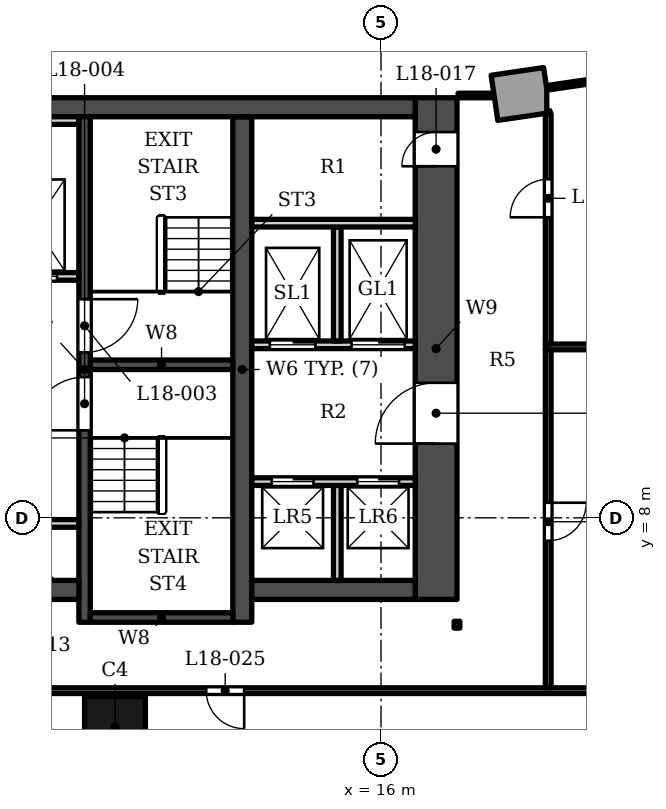
"""IFC4 building model, lengths in metres.
Left out: names, types, materials, properties, quantities, classifications, styles, units other than length and angle.
Written with IfcOpenShell. Run it as: python <this file> out.ifc"""

import sys

from ifc_helpers import new_model, si_unit, direction, frame, frame_2d, origin, origin_2d, place, context, subcontext, project, spatial, polyline, rectangle, outline, extrude, clip, halfspace, element, fill, save


model = new_model("IFC4")
c1 = context("Model", 3, precision=1e-05, world=origin(), true_north=direction((0.0, 1.0)))
c2 = subcontext(c1, "Body", "Model", "MODEL_VIEW")
j1 = project(units=[si_unit("LENGTHUNIT", "METRE"), si_unit("PLANEANGLEUNIT", "RADIAN")], contexts=[c1])
p1 = place(None, origin())
s1 = spatial("IfcSite", under=j1, at=p1, CompositionType="ELEMENT")
p2 = place(p1, origin())
s2 = spatial("IfcBuilding", under=s1, at=p2, CompositionType="ELEMENT")
p3 = place(p2, frame((0.0, 0.0, 86.8)))
s3 = spatial("IfcBuildingStorey", under=s2, at=p3, CompositionType="ELEMENT", Elevation=86.8)
p4 = place(p3, frame((-16.9, 18.802, 0.0), z_axis=(0.0, 0.0, 1.0), x_axis=(1.0, 0.0, 0.0)))
e1 = element("IfcWall", 1, at=p4, inside=s3, PredefinedType="SHEAR", context=c2, shape_type="SweptSolid", body=[
    extrude(rectangle(XDim=33.8, YDim=0.5, at=frame_2d((16.9, 0.0))), origin(), (0.0, 0.0, 1.0), 5.0),
])
p5 = place(p3, frame((12.35, 5.253, 0.0), z_axis=(0.0, 0.0, 1.0), x_axis=(0.0, 1.0, 0.0)))
e2 = element("IfcWall", 2, at=p5, inside=s3, PredefinedType="SHEAR", context=c2, shape_type="SweptSolid", body=[
    extrude(rectangle(XDim=13.3, YDim=0.5, at=frame_2d((6.65, 0.0))), origin(), (0.0, 0.0, 1.0), 5.0),
])
p6 = place(p3, frame((8.2, 5.253, 0.0), z_axis=(0.0, 0.0, 1.0), x_axis=(0.0, 1.0, 0.0)))
e3 = element("IfcWall", 3, at=p6, inside=s3, PredefinedType="SHEAR", context=c2, shape_type="SweptSolid", body=[
    extrude(rectangle(XDim=13.3, YDim=0.3, at=frame_2d((6.65, 0.0))), origin(), (0.0, 0.0, 1.0), 5.0),
])
p7 = place(p6, frame((7.1, 0.0, 0.0)))
e4 = element("IfcOpeningElement", 4, at=p7, cuts=e3, PredefinedType="OPENING", context=c2, shape_type="SweptSolid", body=[
    extrude(rectangle(XDim=1.4, YDim=2.1, at=frame_2d((0.7, 1.05))), frame((0.0, 0.16, 0.0), z_axis=(0.0, -1.0, 0.0), x_axis=(1.0, 0.0, 0.0)), (0.0, 0.0, 1.0), 0.32),
])
p8 = place(p6, frame((5.05, 0.0, 0.0)))
e5 = element("IfcOpeningElement", 5, at=p8, cuts=e3, PredefinedType="OPENING", context=c2, shape_type="SweptSolid", body=[
    extrude(rectangle(XDim=1.4, YDim=2.1, at=frame_2d((0.7, 1.05))), frame((0.0, 0.16, 0.0), z_axis=(0.0, -1.0, 0.0), x_axis=(1.0, 0.0, 0.0)), (0.0, 0.0, 1.0), 0.32),
])
for number, where, z_axis, x_axis in (
    (6, (8.35, 12.028, 0.0), (0.0, 0.0, 1.0), (1.0, 0.0, 0.0)),
    (7, (8.35, 5.378, 0.0), (0.0, 0.0, 1.0), (1.0, 0.0, 0.0)),
):
    element("IfcWall", number, at=place(p3, frame(where, z_axis=z_axis, x_axis=x_axis)), inside=s3, PredefinedType="SHEAR", context=c2, shape_type="SweptSolid", body=[
        extrude(rectangle(XDim=3.75, YDim=0.25, at=frame_2d((1.875, 0.0))), origin(), (0.0, 0.0, 1.0), 5.0),
    ])
p9 = place(p3, frame((1.0, 6.103, 0.0), z_axis=(0.0, 0.0, 1.0), x_axis=(1.0, 0.0, 0.0)))
e8 = element("IfcWall", 8, at=p9, inside=s3, PredefinedType="SHEAR", context=c2, shape_type="SweptSolid", body=[
    extrude(rectangle(XDim=7.05, YDim=0.5, at=frame_2d((3.525, 0.0))), origin(), (0.0, 0.0, 1.0), 5.0),
])
p10 = place(p9, frame((5.325, 0.0, 0.0)))
e9 = element("IfcOpeningElement", 9, at=p10, cuts=e8, PredefinedType="OPENING", context=c2, shape_type="SweptSolid", body=[
    extrude(rectangle(XDim=0.9, YDim=2.1, at=frame_2d((0.45, 1.05))), frame((0.0, 0.26, 0.0), z_axis=(0.0, -1.0, 0.0), x_axis=(1.0, 0.0, 0.0)), (0.0, 0.0, 1.0), 0.52),
])
p11 = place(p3, frame((12.6, 6.103, 0.0), z_axis=(0.0, 0.0, 1.0), x_axis=(1.0, 0.0, 0.0)))
e10 = element("IfcWall", 10, at=p11, inside=s3, PredefinedType="SHEAR", context=c2, shape_type="SweptSolid", body=[
    extrude(rectangle(XDim=4.3, YDim=0.5, at=frame_2d((2.15, 0.0))), origin(), (0.0, 0.0, 1.0), 5.0),
])
p12 = place(p3, frame((17.45, 5.853, 0.0), z_axis=(0.0, 0.0, 1.0), x_axis=(0.0, 1.0, 0.0)))
e11 = element("IfcWall", 11, at=p12, inside=s3, PredefinedType="SHEAR", context=c2, shape_type="SweptSolid", body=[
    extrude(rectangle(XDim=13.2, YDim=1.1, at=frame_2d((6.6, 0.0))), origin(), (0.0, 0.0, 1.0), 5.0),
])
p13 = place(p12, frame((4.1, 0.0, 0.0)))
e12 = element("IfcOpeningElement", 12, at=p13, cuts=e11, PredefinedType="OPENING", context=c2, shape_type="SweptSolid", body=[
    extrude(rectangle(XDim=1.6, YDim=2.1, at=frame_2d((0.8, 1.05))), frame((0.0, 0.56, 0.0), z_axis=(0.0, -1.0, 0.0), x_axis=(1.0, 0.0, 0.0)), (0.0, 0.0, 1.0), 1.12),
])
p14 = place(p12, frame((11.397, 0.0, 0.0)))
e13 = element("IfcOpeningElement", 13, at=p14, cuts=e11, PredefinedType="OPENING", context=c2, shape_type="SweptSolid", body=[
    extrude(rectangle(XDim=0.9, YDim=2.1, at=frame_2d((0.45, 1.05))), frame((0.0, 0.56, 0.0), z_axis=(0.0, -1.0, 0.0), x_axis=(1.0, 0.0, 0.0)), (0.0, 0.0, 1.0), 1.12),
])
p15 = place(p3, frame((9.0, 2.5, 0.0), z_axis=(0.0, 0.0, 1.0), x_axis=(1.0, 0.0, 0.0)))
e14 = element("IfcColumn", 14, at=p15, inside=s3, PredefinedType="COLUMN", context=c2, shape_type="SweptSolid", body=[
    extrude(rectangle(XDim=1.6, YDim=1.6, at=origin_2d()), origin(), (0.0, 0.0, 1.0), 5.0),
])
p16 = place(p3, frame((24.931, 19.036, 0.0), z_axis=(-0.635219622269, 0.043525213878, 0.771104135147), x_axis=(-0.068359659666, -0.997660742402, 0.0)))
e15 = element("IfcColumn", 15, at=p16, inside=s3, PredefinedType="COLUMN", context=c2, shape_type="Clipping", body=[
    clip(clip(extrude(rectangle(XDim=0.9, YDim=1.2, at=origin_2d()), origin(), (0.0, 0.0, 1.0), 6.484), halfspace(frame((0.0, 0.0, 0.501), z_axis=(0.0, 0.0, 1.0), x_axis=(1.0, 0.0, 0.0)), True)), halfspace(frame((0.0, 0.0, 5.983), z_axis=(0.0, 0.0, 1.0), x_axis=(1.0, 0.0, 0.0)), False)),
])
p17 = place(p3, origin())
e16 = element("IfcWall", 16, at=p17, inside=s3, PredefinedType="SOLIDWALL", context=c2, shape_type="SweptSolid", body=[
    extrude(outline(polyline([(18.899, 19.644), (20.28, 19.847), (20.362, 19.288), (20.362, 18.718), (20.447, 18.712), (20.454, 18.659), (19.073, 18.457), (18.899, 19.644)])), origin(), (0.0, 0.0, 1.0), 3.5),
])
p18 = place(p3, frame((20.37, 19.314, 0.0), z_axis=(0.0, 0.0, 1.0), x_axis=(0.989431994424, 0.144997684157, 0.0)))
e17 = element("IfcWall", 17, at=p18, inside=s3, PredefinedType="SOLIDWALL", context=c2, shape_type="SweptSolid", body=[
    extrude(rectangle(XDim=2.79, YDim=0.12, at=frame_2d((1.395, 0.0))), origin(), (0.0, 0.0, 1.0), 3.5),
])
p19 = place(p3, frame((18.03, 19.113, 0.0), z_axis=(0.0, 0.0, 1.0), x_axis=(1.0, 0.0, 0.0)))
e18 = element("IfcWall", 18, at=p19, inside=s3, PredefinedType="SOLIDWALL", context=c2, shape_type="SweptSolid", body=[
    extrude(rectangle(XDim=0.94, YDim=0.12, at=frame_2d((0.47, 0.0))), origin(), (0.0, 0.0, 1.0), 3.5),
])
for number, where, z_axis, x_axis in (
    (19, (14.85, 6.353, 0.0), (0.0, 0.0, 1.0), (0.0, 1.0, 0.0)),
    (20, (5.55, 7.853, 0.0), (0.0, 0.0, 1.0), (1.0, 0.0, 0.0)),
):
    element("IfcWall", number, at=place(p3, frame(where, z_axis=z_axis, x_axis=x_axis)), inside=s3, PredefinedType="SOLIDWALL", context=c2, shape_type="SweptSolid", body=[
        extrude(rectangle(XDim=2.5, YDim=0.2, at=frame_2d((1.25, 0.0))), origin(), (0.0, 0.0, 1.0), 4.83),
    ])
p20 = place(p3, frame((12.6, 8.953, 0.0), z_axis=(0.0, 0.0, 1.0), x_axis=(1.0, 0.0, 0.0)))
e21 = element("IfcWall", 21, at=p20, inside=s3, PredefinedType="SOLIDWALL", context=c2, shape_type="SweptSolid", body=[
    extrude(rectangle(XDim=4.3, YDim=0.2, at=frame_2d((2.15, 0.0))), origin(), (0.0, 0.0, 1.0), 4.83),
])
p21 = place(p20, frame((0.525, 0.0, 0.0)))
e22 = element("IfcOpeningElement", 22, at=p21, cuts=e21, PredefinedType="OPENING", context=c2, shape_type="SweptSolid", body=[
    extrude(rectangle(XDim=1.1, YDim=2.1, at=frame_2d((0.55, 1.05))), frame((0.0, 0.11, 0.0), z_axis=(0.0, -1.0, 0.0), x_axis=(1.0, 0.0, 0.0)), (0.0, 0.0, 1.0), 0.22),
])
p22 = place(p20, frame((2.775, 0.0, 0.0)))
e23 = element("IfcOpeningElement", 23, at=p22, cuts=e21, PredefinedType="OPENING", context=c2, shape_type="SweptSolid", body=[
    extrude(rectangle(XDim=1.1, YDim=2.1, at=frame_2d((0.55, 1.05))), frame((0.0, 0.11, 0.0), z_axis=(0.0, -1.0, 0.0), x_axis=(1.0, 0.0, 0.0)), (0.0, 0.0, 1.0), 0.22),
])
p23 = place(p3, frame((12.6, 12.552, 0.0), z_axis=(0.0, 0.0, 1.0), x_axis=(1.0, 0.0, 0.0)))
e24 = element("IfcWall", 24, at=p23, inside=s3, PredefinedType="SOLIDWALL", context=c2, shape_type="SweptSolid", body=[
    extrude(rectangle(XDim=4.3, YDim=0.2, at=frame_2d((2.15, 0.0))), origin(), (0.0, 0.0, 1.0), 4.83),
])
p24 = place(p23, frame((0.475, 0.0, 0.0)))
e25 = element("IfcOpeningElement", 25, at=p24, cuts=e24, PredefinedType="OPENING", context=c2, shape_type="SweptSolid", body=[
    extrude(rectangle(XDim=1.2, YDim=2.1, at=frame_2d((0.6, 1.05))), frame((0.0, 0.11, 0.0), z_axis=(0.0, -1.0, 0.0), x_axis=(1.0, 0.0, 0.0)), (0.0, 0.0, 1.0), 0.22),
])
p25 = place(p23, frame((2.625, 0.0, 0.0)))
e26 = element("IfcOpeningElement", 26, at=p25, cuts=e24, PredefinedType="OPENING", context=c2, shape_type="SweptSolid", body=[
    extrude(rectangle(XDim=1.4, YDim=2.1, at=frame_2d((0.7, 1.05))), frame((0.0, 0.11, 0.0), z_axis=(0.0, -1.0, 0.0), x_axis=(1.0, 0.0, 0.0)), (0.0, 0.0, 1.0), 0.22),
])
p26 = place(p3, frame((14.85, 12.653, 0.0), z_axis=(0.0, 0.0, 1.0), x_axis=(0.0, 1.0, 0.0)))
e27 = element("IfcWall", 27, at=p26, inside=s3, PredefinedType="SOLIDWALL", context=c2, shape_type="SweptSolid", body=[
    extrude(rectangle(XDim=3.0, YDim=0.2, at=frame_2d((1.5, 0.0))), origin(), (0.0, 0.0, 1.0), 4.83),
])
p27 = place(p3, frame((5.3, 14.353, 0.0), z_axis=(0.0, 0.0, 1.0), x_axis=(1.0, 0.0, 0.0)))
e28 = element("IfcWall", 28, at=p27, inside=s3, PredefinedType="SOLIDWALL", context=c2, shape_type="SweptSolid", body=[
    extrude(rectangle(XDim=2.75, YDim=0.2, at=frame_2d((1.375, 0.0))), origin(), (0.0, 0.0, 1.0), 4.83),
])
p28 = place(p27, frame((0.975, 0.0, 0.0)))
e29 = element("IfcOpeningElement", 29, at=p28, cuts=e28, PredefinedType="OPENING", context=c2, shape_type="SweptSolid", body=[
    extrude(rectangle(XDim=1.2, YDim=2.1, at=frame_2d((0.6, 1.05))), frame((0.0, 0.11, 0.0), z_axis=(0.0, -1.0, 0.0), x_axis=(1.0, 0.0, 0.0)), (0.0, 0.0, 1.0), 0.22),
])
p29 = place(p3, frame((12.6, 15.753, 0.0), z_axis=(0.0, 0.0, 1.0), x_axis=(1.0, 0.0, 0.0)))
e30 = element("IfcWall", 30, at=p29, inside=s3, PredefinedType="SOLIDWALL", context=c2, shape_type="SweptSolid", body=[
    extrude(rectangle(XDim=4.3, YDim=0.2, at=frame_2d((2.15, 0.0))), origin(), (0.0, 0.0, 1.0), 4.83),
])
p30 = place(p3, frame((5.5, 18.453, 0.0), z_axis=(0.0, 0.0, 1.0), x_axis=(1.0, 0.0, 0.0)))
e31 = element("IfcWall", 31, at=p30, inside=s3, PredefinedType="SOLIDWALL", context=c2, shape_type="SweptSolid", body=[
    extrude(rectangle(XDim=2.55, YDim=0.2, at=frame_2d((1.275, 0.0))), origin(), (0.0, 0.0, 1.0), 4.83),
])
p31 = place(p3, frame((5.895, 3.453, 0.0), z_axis=(0.0, 0.0, 1.0), x_axis=(1.0, 0.0, 0.0)))
e32 = element("IfcWall", 32, at=p31, inside=s3, PredefinedType="PARTITIONING", context=c2, shape_type="SweptSolid", body=[
    extrude(rectangle(XDim=18.118, YDim=0.15, at=frame_2d((9.059, 0.0))), origin(), (0.0, 0.0, 1.0), 3.752),
])
p32 = place(p31, frame((5.505, 0.0, 0.0)))
e33 = element("IfcOpeningElement", 33, at=p32, cuts=e32, PredefinedType="OPENING", context=c2, shape_type="SweptSolid", body=[
    extrude(rectangle(XDim=1.0, YDim=2.1, at=frame_2d((0.5, 1.05))), frame((0.0, 0.085, 0.0), z_axis=(0.0, -1.0, 0.0), x_axis=(1.0, 0.0, 0.0)), (0.0, 0.0, 1.0), 0.17),
])
p33 = place(p3, frame((20.4, 3.528, 0.0), z_axis=(0.0, 0.0, 1.0), x_axis=(0.0, 1.0, 0.0)))
e34 = element("IfcWall", 34, at=p33, inside=s3, PredefinedType="PARTITIONING", context=c2, shape_type="SweptSolid", body=[
    extrude(rectangle(XDim=8.895, YDim=0.15, at=frame_2d((4.447, 0.0))), origin(), (0.0, 0.0, 1.0), 4.05),
])
p34 = place(p33, frame((3.869, 0.0, 0.0)))
e35 = element("IfcOpeningElement", 35, at=p34, cuts=e34, PredefinedType="OPENING", context=c2, shape_type="SweptSolid", body=[
    extrude(rectangle(XDim=1.0, YDim=2.1, at=frame_2d((0.5, 1.05))), frame((0.0, 0.085, 0.0), z_axis=(0.0, -1.0, 0.0), x_axis=(1.0, 0.0, 0.0)), (0.0, 0.0, 1.0), 0.17),
])
p35 = place(p3, frame((18.0, 5.098, 0.0), z_axis=(0.0, 0.0, 1.0), x_axis=(0.0, 1.0, 0.0)))
e36 = element("IfcWall", 36, at=p35, inside=s3, PredefinedType="PARTITIONING", context=c2, shape_type="SweptSolid", body=[
    extrude(rectangle(XDim=0.18, YDim=0.15, at=frame_2d((0.09, 0.0))), origin(), (0.0, 0.0, 1.0), 4.05),
])
p36 = place(p3, frame((20.325, 12.497, 0.0), z_axis=(0.0, 0.0, 1.0), x_axis=(1.0, 0.0, 0.0)))
e37 = element("IfcWall", 37, at=p36, inside=s3, PredefinedType="PARTITIONING", context=c2, shape_type="SweptSolid", body=[
    extrude(rectangle(XDim=9.289, YDim=0.15, at=frame_2d((4.644, 0.0))), origin(), (0.0, 0.0, 1.0), 4.152),
])
p37 = place(p3, frame((20.4, 12.572, 0.0), z_axis=(0.0, 0.0, 1.0), x_axis=(0.0, 1.0, 0.0)))
e38 = element("IfcWall", 38, at=p37, inside=s3, PredefinedType="PARTITIONING", context=c2, shape_type="SweptSolid", body=[
    extrude(rectangle(XDim=6.059, YDim=0.15, at=frame_2d((3.03, 0.0))), origin(), (0.0, 0.0, 1.0), 3.752),
])
p38 = place(p37, frame((3.336, 0.0, 0.0)))
e39 = element("IfcOpeningElement", 39, at=p38, cuts=e38, PredefinedType="OPENING", context=c2, shape_type="SweptSolid", body=[
    extrude(rectangle(XDim=1.0, YDim=2.1, at=frame_2d((0.5, 1.05))), frame((0.0, 0.085, 0.0), z_axis=(0.0, -1.0, 0.0), x_axis=(1.0, 0.0, 0.0)), (0.0, 0.0, 1.0), 0.17),
])
p39 = place(p28, origin())
e40 = element("IfcDoor", 40, at=p39, inside=s3, OperationType="DOUBLE_DOOR_SLIDING", PredefinedType="DOOR", context=c2, shape_type="SweptSolid", body=[
    extrude(rectangle(XDim=1.2, YDim=2.1, at=frame_2d((0.6, 1.05))), frame((0.0, 0.025, 0.0), z_axis=(0.0, -1.0, 0.0), x_axis=(1.0, 0.0, 0.0)), (0.0, 0.0, 1.0), 0.05),
])
fill(e29, e40)
p40 = place(p21, origin())
e41 = element("IfcDoor", 41, at=p40, inside=s3, OperationType="DOUBLE_DOOR_SLIDING", PredefinedType="DOOR", context=c2, shape_type="SweptSolid", body=[
    extrude(rectangle(XDim=1.1, YDim=2.1, at=frame_2d((0.55, 1.05))), frame((0.0, 0.025, 0.0), z_axis=(0.0, -1.0, 0.0), x_axis=(1.0, 0.0, 0.0)), (0.0, 0.0, 1.0), 0.05),
])
fill(e22, e41)
p41 = place(p22, origin())
e42 = element("IfcDoor", 42, at=p41, inside=s3, OperationType="DOUBLE_DOOR_SLIDING", PredefinedType="DOOR", context=c2, shape_type="SweptSolid", body=[
    extrude(rectangle(XDim=1.1, YDim=2.1, at=frame_2d((0.55, 1.05))), frame((0.0, 0.025, 0.0), z_axis=(0.0, -1.0, 0.0), x_axis=(1.0, 0.0, 0.0)), (0.0, 0.0, 1.0), 0.05),
])
fill(e23, e42)
p42 = place(p24, origin())
e43 = element("IfcDoor", 43, at=p42, inside=s3, OperationType="DOUBLE_DOOR_SLIDING", PredefinedType="DOOR", context=c2, shape_type="SweptSolid", body=[
    extrude(rectangle(XDim=1.2, YDim=2.1, at=frame_2d((0.6, 1.05))), frame((0.0, 0.025, 0.0), z_axis=(0.0, -1.0, 0.0), x_axis=(1.0, 0.0, 0.0)), (0.0, 0.0, 1.0), 0.05),
])
fill(e25, e43)
p43 = place(p25, origin())
e44 = element("IfcDoor", 44, at=p43, inside=s3, OperationType="DOUBLE_DOOR_SLIDING", PredefinedType="DOOR", context=c2, shape_type="SweptSolid", body=[
    extrude(rectangle(XDim=1.4, YDim=2.1, at=frame_2d((0.7, 1.05))), frame((0.0, 0.025, 0.0), z_axis=(0.0, -1.0, 0.0), x_axis=(1.0, 0.0, 0.0)), (0.0, 0.0, 1.0), 0.05),
])
fill(e26, e44)
p44 = place(p7, origin())
e45 = element("IfcDoor", 45, at=p44, inside=s3, OperationType="SINGLE_SWING_RIGHT", PredefinedType="DOOR", context=c2, shape_type="SweptSolid", body=[
    extrude(rectangle(XDim=1.4, YDim=2.1, at=frame_2d((0.7, 1.05))), frame((0.0, 0.025, 0.0), z_axis=(0.0, -1.0, 0.0), x_axis=(1.0, 0.0, 0.0)), (0.0, 0.0, 1.0), 0.05),
])
fill(e4, e45)
p45 = place(p8, origin())
e46 = element("IfcDoor", 46, at=p45, inside=s3, OperationType="SINGLE_SWING_LEFT", PredefinedType="DOOR", context=c2, shape_type="SweptSolid", body=[
    extrude(rectangle(XDim=1.4, YDim=2.1, at=frame_2d((0.7, 1.05))), frame((0.0, 0.025, 0.0), z_axis=(0.0, -1.0, 0.0), x_axis=(1.0, 0.0, 0.0)), (0.0, 0.0, 1.0), 0.05),
])
fill(e5, e46)
p46 = place(p13, origin())
e47 = element("IfcDoor", 47, at=p46, inside=s3, OperationType="DOUBLE_DOOR_SINGLE_SWING", PredefinedType="DOOR", context=c2, shape_type="SweptSolid", body=[
    extrude(rectangle(XDim=1.6, YDim=2.1, at=frame_2d((0.8, 1.05))), frame((0.0, 0.275, 0.0), z_axis=(0.0, -1.0, 0.0), x_axis=(1.0, 0.0, 0.0)), (0.0, 0.0, 1.0), 0.05),
])
fill(e12, e47)
p47 = place(p14, origin())
e48 = element("IfcDoor", 48, at=p47, inside=s3, OperationType="SINGLE_SWING_LEFT", PredefinedType="DOOR", context=c2, shape_type="SweptSolid", body=[
    extrude(rectangle(XDim=0.9, YDim=2.1, at=frame_2d((0.45, 1.05))), frame((0.0, 0.275, 0.0), z_axis=(0.0, -1.0, 0.0), x_axis=(1.0, 0.0, 0.0)), (0.0, 0.0, 1.0), 0.05),
])
fill(e13, e48)
p48 = place(p38, origin())
e49 = element("IfcDoor", 49, at=p48, inside=s3, OperationType="SINGLE_SWING_LEFT", PredefinedType="DOOR", context=c2, shape_type="SweptSolid", body=[
    extrude(rectangle(XDim=1.0, YDim=2.1, at=frame_2d((0.5, 1.05))), frame((0.0, 0.025, 0.0), z_axis=(0.0, -1.0, 0.0), x_axis=(1.0, 0.0, 0.0)), (0.0, 0.0, 1.0), 0.05),
])
fill(e39, e49)
p49 = place(p34, origin())
e50 = element("IfcDoor", 50, at=p49, inside=s3, OperationType="SINGLE_SWING_RIGHT", PredefinedType="DOOR", context=c2, shape_type="SweptSolid", body=[
    extrude(rectangle(XDim=1.0, YDim=2.1, at=frame_2d((0.5, 1.05))), frame((0.0, 0.025, 0.0), z_axis=(0.0, -1.0, 0.0), x_axis=(1.0, 0.0, 0.0)), (0.0, 0.0, 1.0), 0.05),
])
fill(e35, e50)
p50 = place(p32, origin())
e51 = element("IfcDoor", 51, at=p50, inside=s3, OperationType="SINGLE_SWING_RIGHT", PredefinedType="DOOR", context=c2, shape_type="SweptSolid", body=[
    extrude(rectangle(XDim=1.0, YDim=2.1, at=frame_2d((0.5, 1.05))), frame((0.0, 0.025, 0.0), z_axis=(0.0, -1.0, 0.0), x_axis=(1.0, 0.0, 0.0)), (0.0, 0.0, 1.0), 0.05),
])
fill(e33, e51)
save(model, sys.argv[1])
